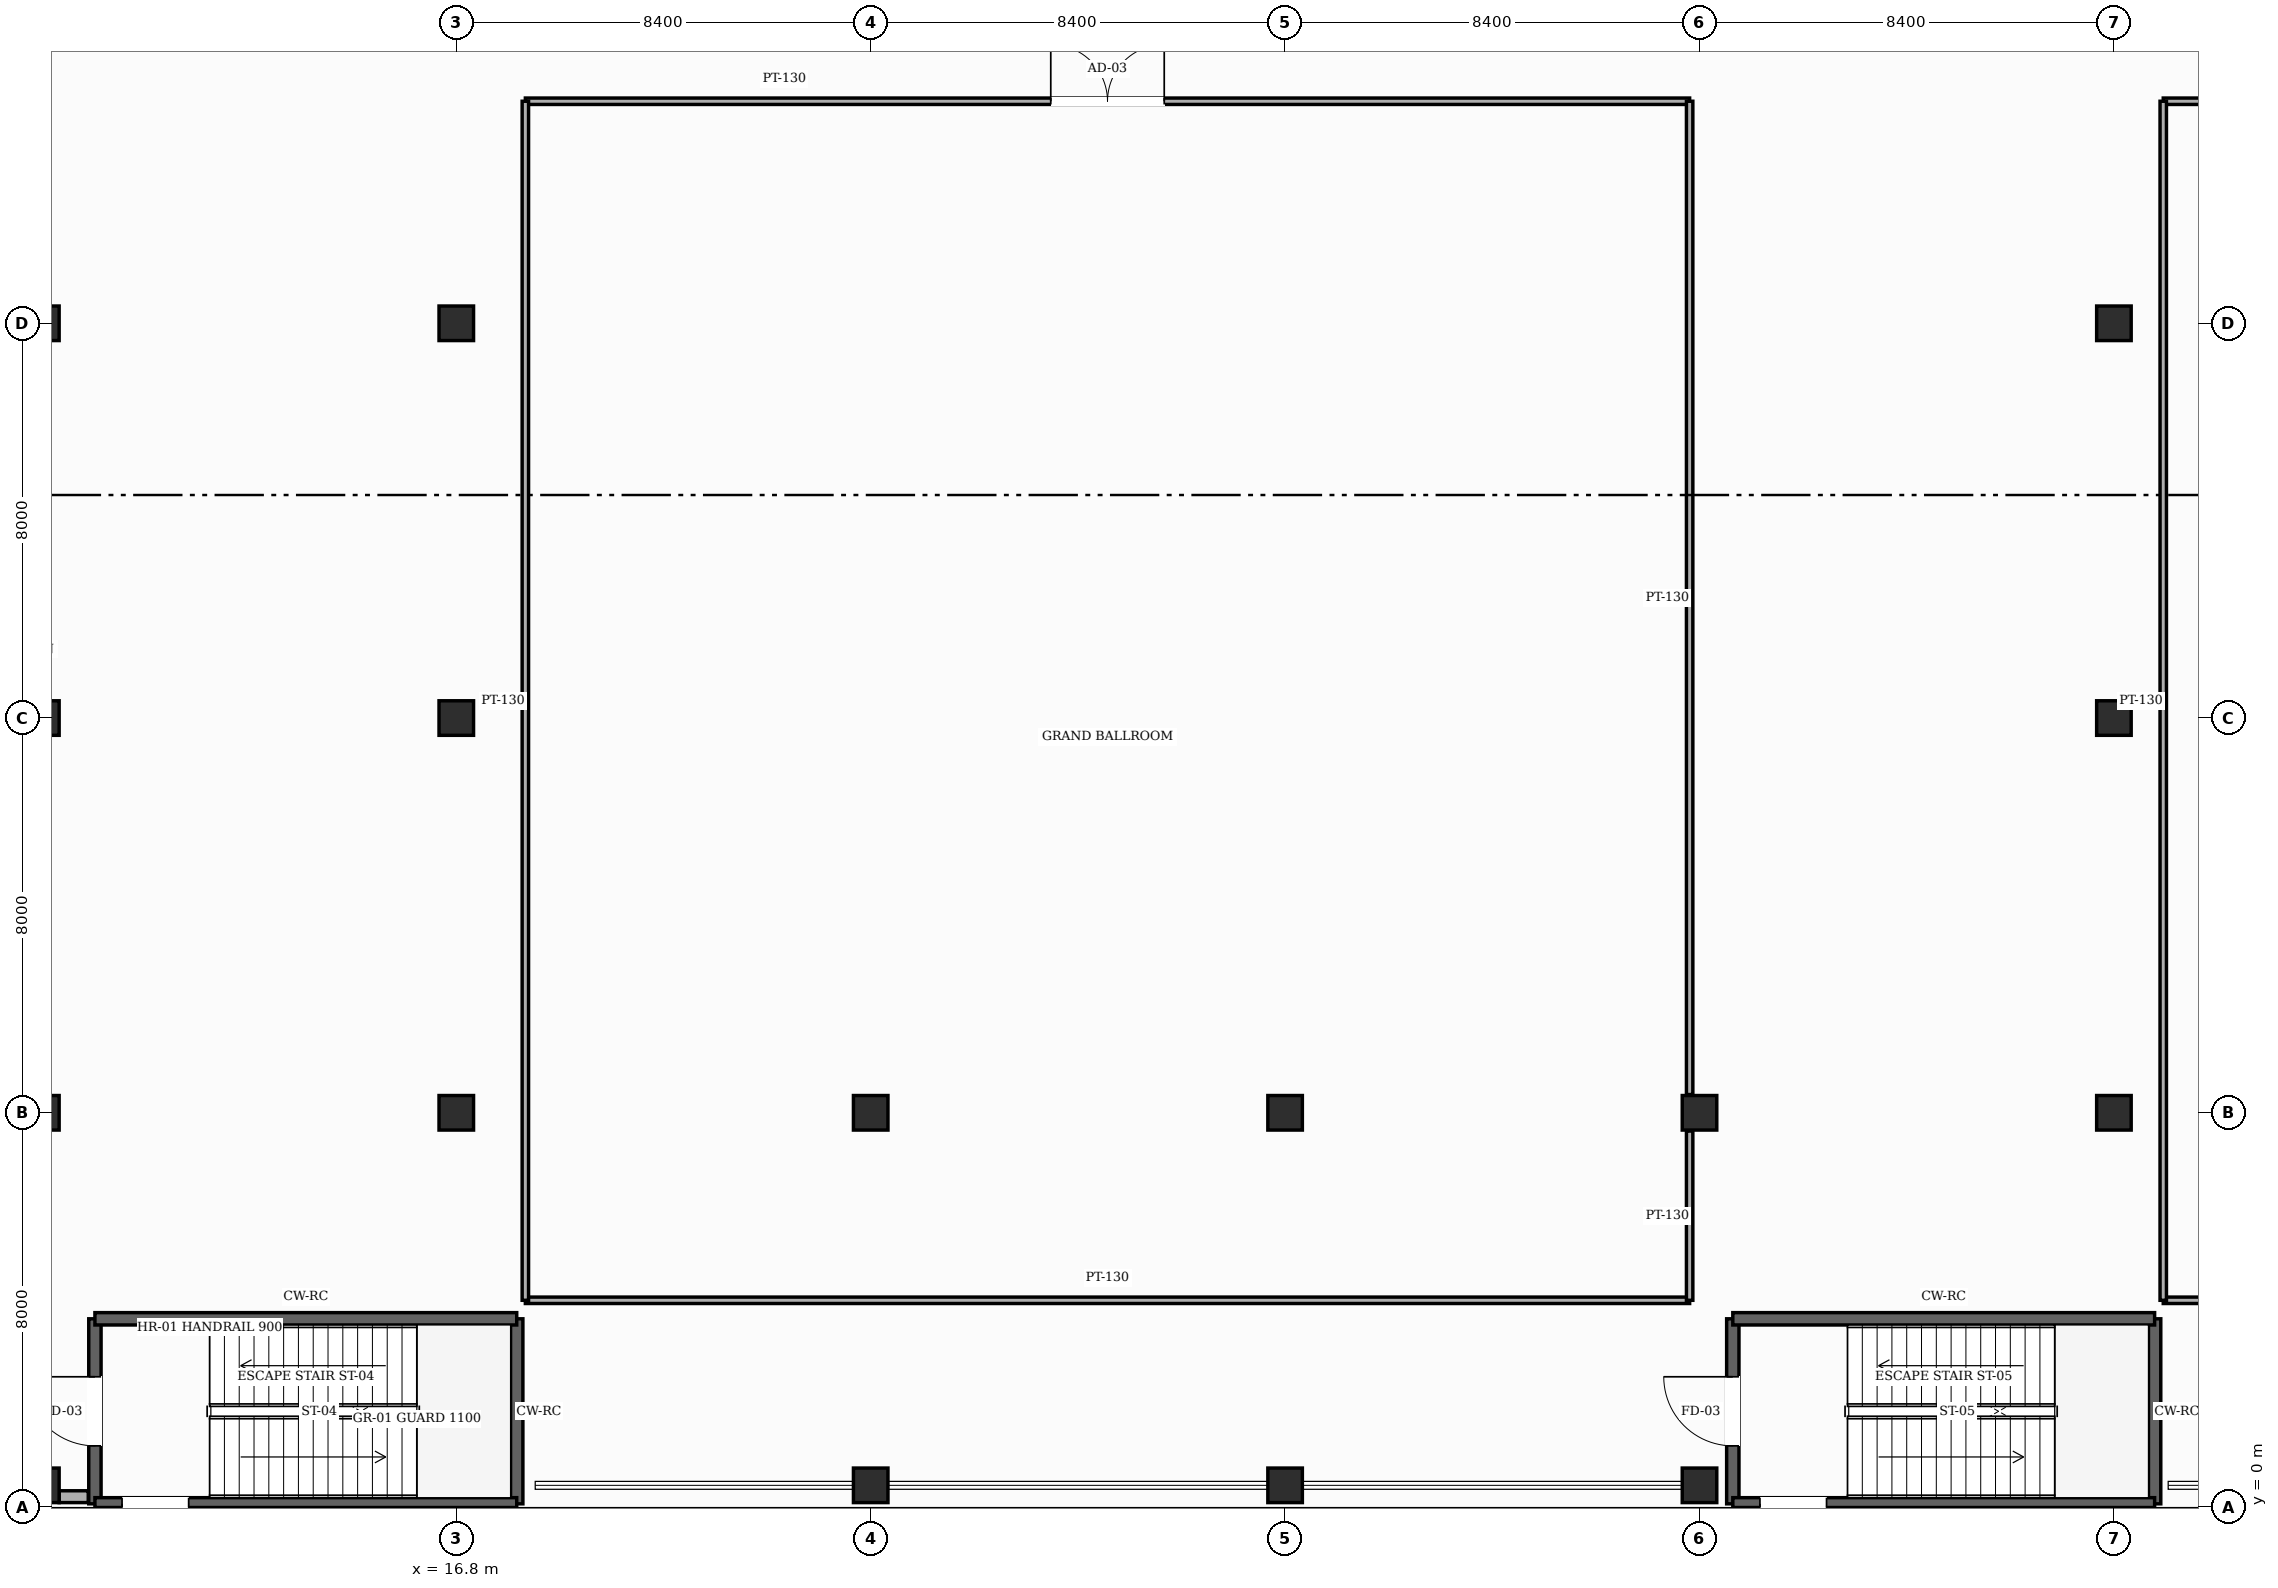
"""IFC4 building model, lengths in metres.
Left out: names, types, materials, properties, quantities, classifications, styles, units other than length and angle.
Written with IfcOpenShell. Run it as: python <this file> out.ifc"""

import sys

from ifc_helpers import new_model, si_unit, direction, frame, frame_2d, origin, origin_2d, place, context, subcontext, project, spatial, rectangle, hollow_rectangle, extrude, element, fill, save


model = new_model("IFC4")
c1 = context("Model", 3, precision=1e-05, world=origin(), true_north=direction((0.0, 1.0)))
c2 = subcontext(c1, "Body", "Model", "MODEL_VIEW")
j1 = project(units=[si_unit("LENGTHUNIT", "METRE"), si_unit("PLANEANGLEUNIT", "RADIAN")], contexts=[c1])
p1 = place(None, origin())
s1 = spatial("IfcSite", under=j1, at=p1, CompositionType="ELEMENT")
p2 = place(p1, origin())
s2 = spatial("IfcBuilding", under=s1, at=p2, CompositionType="ELEMENT")
p3 = place(p2, origin())
s3 = spatial("IfcBuildingStorey", under=s2, at=p3, CompositionType="ELEMENT", Elevation=0.0)
for number, where, z_axis, x_axis in (
    (1, (8.4, 0.45, 0.0), (0.0, 0.0, 1.0), (1.0, 0.0, 0.0)),
    (2, (8.4, 8.0, 0.0), (0.0, 0.0, 1.0), (1.0, 0.0, 0.0)),
    (3, (8.4, 16.0, 0.0), (0.0, 0.0, 1.0), (1.0, 0.0, 0.0)),
    (4, (8.4, 24.0, 0.0), (0.0, 0.0, 1.0), (1.0, 0.0, 0.0)),
    (5, (16.8, 8.0, 0.0), (0.0, 0.0, 1.0), (1.0, 0.0, 0.0)),
    (6, (16.8, 16.0, 0.0), (0.0, 0.0, 1.0), (1.0, 0.0, 0.0)),
    (7, (16.8, 24.0, 0.0), (0.0, 0.0, 1.0), (1.0, 0.0, 0.0)),
    (8, (25.2, 0.45, 0.0), (0.0, 0.0, 1.0), (1.0, 0.0, 0.0)),
    (9, (25.2, 8.0, 0.0), (0.0, 0.0, 1.0), (1.0, 0.0, 0.0)),
    (10, (33.6, 0.45, 0.0), (0.0, 0.0, 1.0), (1.0, 0.0, 0.0)),
    (11, (33.6, 8.0, 0.0), (0.0, 0.0, 1.0), (1.0, 0.0, 0.0)),
    (12, (42.0, 0.45, 0.0), (0.0, 0.0, 1.0), (1.0, 0.0, 0.0)),
    (13, (42.0, 8.0, 0.0), (0.0, 0.0, 1.0), (1.0, 0.0, 0.0)),
    (14, (50.4, 8.0, 0.0), (0.0, 0.0, 1.0), (1.0, 0.0, 0.0)),
    (15, (50.4, 16.0, 0.0), (0.0, 0.0, 1.0), (1.0, 0.0, 0.0)),
    (16, (50.4, 24.0, 0.0), (0.0, 0.0, 1.0), (1.0, 0.0, 0.0)),
):
    element("IfcColumn", number, at=place(p3, frame(where, z_axis=z_axis, x_axis=x_axis)), inside=s3, PredefinedType="COLUMN", context=c2, shape_type="SweptSolid", body=[
        extrude(hollow_rectangle(XDim=0.7, YDim=0.7, WallThickness=0.028, InnerFilletRadius=0.028, OuterFilletRadius=0.056, at=origin_2d()), origin(), (0.0, 0.0, 1.0), 5.4),
    ])
p4 = place(p3, frame((9.34, 0.22, 0.0), z_axis=(0.0, 0.0, 1.0), x_axis=(-1.0, 0.0, 0.0)))
e17 = element("IfcWall", 17, at=p4, inside=s3, PredefinedType="SOLIDWALL", context=c2, shape_type="SweptSolid", body=[
    extrude(rectangle(XDim=0.59, YDim=0.24, at=frame_2d((0.295, 0.0))), origin(), (0.0, 0.0, 1.0), 5.135),
])
p5 = place(p3, frame((9.475, 0.075, 0.0), z_axis=(0.0, 0.0, 1.0), x_axis=(0.0, 1.0, 0.0)))
e18 = element("IfcWall", 18, at=p5, inside=s3, PredefinedType="SHEAR", context=c2, shape_type="SweptSolid", body=[
    extrude(rectangle(XDim=3.75, YDim=0.25, at=frame_2d((1.875, 0.0))), origin(), (0.0, 0.0, 1.0), 5.15),
])
p6 = place(p5, frame((1.175, 0.0, 0.0)))
e19 = element("IfcOpeningElement", 19, at=p6, cuts=e18, PredefinedType="OPENING", context=c2, shape_type="SweptSolid", body=[
    extrude(rectangle(XDim=1.4, YDim=2.25, at=frame_2d((0.7, 1.125))), frame((0.0, 0.135, 0.0), z_axis=(0.0, -1.0, 0.0), x_axis=(1.0, 0.0, 0.0)), (0.0, 0.0, 1.0), 0.27),
])
p7 = place(p3, frame((18.025, 3.825, 0.0), z_axis=(0.0, 0.0, 1.0), x_axis=(0.0, -1.0, 0.0)))
e20 = element("IfcWall", 20, at=p7, inside=s3, PredefinedType="SHEAR", context=c2, shape_type="SweptSolid", body=[
    extrude(rectangle(XDim=3.75, YDim=0.25, at=frame_2d((1.875, 0.0))), origin(), (0.0, 0.0, 1.0), 5.15),
])
p8 = place(p3, frame((18.025, 0.075, 0.0), z_axis=(0.0, 0.0, 1.0), x_axis=(-1.0, 0.0, 0.0)))
e21 = element("IfcWall", 21, at=p8, inside=s3, PredefinedType="SHEAR", context=c2, shape_type="SweptSolid", body=[
    extrude(rectangle(XDim=8.55, YDim=0.25, at=frame_2d((4.275, 0.0))), origin(), (0.0, 0.0, 1.0), 5.15),
])
p9 = place(p8, frame((6.65, 0.0, 0.0)))
e22 = element("IfcOpeningElement", 22, at=p9, cuts=e21, PredefinedType="OPENING", context=c2, shape_type="SweptSolid", body=[
    extrude(rectangle(XDim=1.35, YDim=2.3, at=frame_2d((0.675, 1.15))), frame((0.0, 0.135, 0.0), z_axis=(0.0, -1.0, 0.0), x_axis=(1.0, 0.0, 0.0)), (0.0, 0.0, 1.0), 0.27),
])
p10 = place(p3, frame((9.475, 3.825, 0.0), z_axis=(0.0, 0.0, 1.0), x_axis=(1.0, 0.0, 0.0)))
e23 = element("IfcWall", 23, at=p10, inside=s3, PredefinedType="SHEAR", context=c2, shape_type="SweptSolid", body=[
    extrude(rectangle(XDim=8.55, YDim=0.25, at=frame_2d((4.275, 0.0))), origin(), (0.0, 0.0, 1.0), 5.15),
])
p11 = place(p3, frame((42.675, 0.075, 0.0), z_axis=(0.0, 0.0, 1.0), x_axis=(0.0, 1.0, 0.0)))
e24 = element("IfcWall", 24, at=p11, inside=s3, PredefinedType="SHEAR", context=c2, shape_type="SweptSolid", body=[
    extrude(rectangle(XDim=3.75, YDim=0.25, at=frame_2d((1.875, 0.0))), origin(), (0.0, 0.0, 1.0), 5.15),
])
p12 = place(p11, frame((1.175, 0.0, 0.0)))
e25 = element("IfcOpeningElement", 25, at=p12, cuts=e24, PredefinedType="OPENING", context=c2, shape_type="SweptSolid", body=[
    extrude(rectangle(XDim=1.4, YDim=2.25, at=frame_2d((0.7, 1.125))), frame((0.0, 0.135, 0.0), z_axis=(0.0, -1.0, 0.0), x_axis=(1.0, 0.0, 0.0)), (0.0, 0.0, 1.0), 0.27),
])
p13 = place(p3, frame((51.225, 3.825, 0.0), z_axis=(0.0, 0.0, 1.0), x_axis=(0.0, -1.0, 0.0)))
e26 = element("IfcWall", 26, at=p13, inside=s3, PredefinedType="SHEAR", context=c2, shape_type="SweptSolid", body=[
    extrude(rectangle(XDim=3.75, YDim=0.25, at=frame_2d((1.875, 0.0))), origin(), (0.0, 0.0, 1.0), 5.15),
])
p14 = place(p3, frame((51.225, 0.075, 0.0), z_axis=(0.0, 0.0, 1.0), x_axis=(-1.0, 0.0, 0.0)))
e27 = element("IfcWall", 27, at=p14, inside=s3, PredefinedType="SHEAR", context=c2, shape_type="SweptSolid", body=[
    extrude(rectangle(XDim=8.55, YDim=0.25, at=frame_2d((4.275, 0.0))), origin(), (0.0, 0.0, 1.0), 5.15),
])
p15 = place(p14, frame((6.65, 0.0, 0.0)))
e28 = element("IfcOpeningElement", 28, at=p15, cuts=e27, PredefinedType="OPENING", context=c2, shape_type="SweptSolid", body=[
    extrude(rectangle(XDim=1.35, YDim=2.3, at=frame_2d((0.675, 1.15))), frame((0.0, 0.135, 0.0), z_axis=(0.0, -1.0, 0.0), x_axis=(1.0, 0.0, 0.0)), (0.0, 0.0, 1.0), 0.27),
])
p16 = place(p3, frame((42.675, 3.825, 0.0), z_axis=(0.0, 0.0, 1.0), x_axis=(1.0, 0.0, 0.0)))
e29 = element("IfcWall", 29, at=p16, inside=s3, PredefinedType="SHEAR", context=c2, shape_type="SweptSolid", body=[
    extrude(rectangle(XDim=8.55, YDim=0.25, at=frame_2d((4.275, 0.0))), origin(), (0.0, 0.0, 1.0), 5.15),
])
p17 = place(p3, frame((18.2, 4.2, 0.0), z_axis=(0.0, 0.0, 1.0), x_axis=(1.0, 0.0, 0.0)))
e30 = element("IfcWall", 30, at=p17, inside=s3, PredefinedType="PARTITIONING", context=c2, shape_type="SweptSolid", body=[
    extrude(rectangle(XDim=23.6, YDim=0.13, at=frame_2d((11.8, 0.0))), origin(), (0.0, 0.0, 1.0), 4.725),
])
p18 = place(p3, frame((51.4, 4.2, 0.0), z_axis=(0.0, 0.0, 1.0), x_axis=(1.0, 0.0, 0.0)))
e31 = element("IfcWall", 31, at=p18, inside=s3, PredefinedType="PARTITIONING", context=c2, shape_type="SweptSolid", body=[
    extrude(rectangle(XDim=6.6, YDim=0.13, at=frame_2d((3.3, 0.0))), origin(), (0.0, 0.0, 1.0), 5.135),
])
p19 = place(p3, frame((18.2, 28.5, 0.0), z_axis=(0.0, 0.0, 1.0), x_axis=(1.0, 0.0, 0.0)))
e32 = element("IfcWall", 32, at=p19, inside=s3, PredefinedType="PARTITIONING", context=c2, shape_type="SweptSolid", body=[
    extrude(rectangle(XDim=23.6, YDim=0.13, at=frame_2d((11.8, 0.0))), origin(), (0.0, 0.0, 1.0), 5.135),
])
p20 = place(p19, frame((10.65, 0.0, 0.0)))
e33 = element("IfcOpeningElement", 33, at=p20, cuts=e32, PredefinedType="OPENING", context=c2, shape_type="SweptSolid", body=[
    extrude(rectangle(XDim=2.3, YDim=2.55, at=frame_2d((1.15, 1.275))), frame((0.0, 0.075, 0.0), z_axis=(0.0, -1.0, 0.0), x_axis=(1.0, 0.0, 0.0)), (0.0, 0.0, 1.0), 0.15),
])
p21 = place(p3, frame((51.4, 28.5, 0.0), z_axis=(0.0, 0.0, 1.0), x_axis=(1.0, 0.0, 0.0)))
e34 = element("IfcWall", 34, at=p21, inside=s3, PredefinedType="PARTITIONING", context=c2, shape_type="SweptSolid", body=[
    extrude(rectangle(XDim=6.6, YDim=0.13, at=frame_2d((3.3, 0.0))), origin(), (0.0, 0.0, 1.0), 5.135),
])
p22 = place(p21, frame((2.275, 0.0, 0.0)))
e35 = element("IfcOpeningElement", 35, at=p22, cuts=e34, PredefinedType="OPENING", context=c2, shape_type="SweptSolid", body=[
    extrude(rectangle(XDim=2.05, YDim=2.45, at=frame_2d((1.025, 1.225))), frame((0.0, 0.075, 0.0), z_axis=(0.0, -1.0, 0.0), x_axis=(1.0, 0.0, 0.0)), (0.0, 0.0, 1.0), 0.15),
])
p23 = place(p3, frame((18.2, 4.2, 0.0), z_axis=(0.0, 0.0, 1.0), x_axis=(0.0, 1.0, 0.0)))
e36 = element("IfcWall", 36, at=p23, inside=s3, PredefinedType="PARTITIONING", context=c2, shape_type="SweptSolid", body=[
    extrude(rectangle(XDim=24.3, YDim=0.13, at=frame_2d((12.15, 0.0))), origin(), (0.0, 0.0, 1.0), 5.135),
])
p24 = place(p3, frame((41.8, 4.2, 0.0), z_axis=(0.0, 0.0, 1.0), x_axis=(0.0, 1.0, 0.0)))
e37 = element("IfcWall", 37, at=p24, inside=s3, PredefinedType="PARTITIONING", context=c2, shape_type="SweptSolid", body=[
    extrude(rectangle(XDim=3.43, YDim=0.13, at=frame_2d((1.715, 0.0))), origin(), (0.0, 0.0, 1.0), 4.475),
])
p25 = place(p3, frame((41.8, 8.37, 0.0), z_axis=(0.0, 0.0, 1.0), x_axis=(0.0, 1.0, 0.0)))
e38 = element("IfcWall", 38, at=p25, inside=s3, PredefinedType="PARTITIONING", context=c2, shape_type="SweptSolid", body=[
    extrude(rectangle(XDim=20.13, YDim=0.13, at=frame_2d((10.065, 0.0))), origin(), (0.0, 0.0, 1.0), 3.925),
])
p26 = place(p3, frame((51.4, 4.2, 0.0), z_axis=(0.0, 0.0, 1.0), x_axis=(0.0, 1.0, 0.0)))
e39 = element("IfcWall", 39, at=p26, inside=s3, PredefinedType="PARTITIONING", context=c2, shape_type="SweptSolid", body=[
    extrude(rectangle(XDim=24.3, YDim=0.13, at=frame_2d((12.15, 0.0))), origin(), (0.0, 0.0, 1.0), 5.135),
])
p27 = place(p6, origin())
e40 = element("IfcDoor", 40, at=p27, inside=s3, OperationType="SINGLE_SWING_RIGHT", PredefinedType="DOOR", context=c2, shape_type="SweptSolid", body=[
    extrude(rectangle(XDim=1.4, YDim=2.25, at=frame_2d((0.7, 1.125))), frame((0.0, 0.025, 0.0), z_axis=(0.0, -1.0, 0.0), x_axis=(1.0, 0.0, 0.0)), (0.0, 0.0, 1.0), 0.05),
])
fill(e19, e40)
p28 = place(p9, origin())
e41 = element("IfcDoor", 41, at=p28, inside=s3, OperationType="SINGLE_SWING_RIGHT", PredefinedType="DOOR", context=c2, shape_type="SweptSolid", body=[
    extrude(rectangle(XDim=1.35, YDim=2.3, at=frame_2d((0.675, 1.15))), frame((0.0, 0.025, 0.0), z_axis=(0.0, -1.0, 0.0), x_axis=(1.0, 0.0, 0.0)), (0.0, 0.0, 1.0), 0.05),
])
fill(e22, e41)
p29 = place(p12, origin())
e42 = element("IfcDoor", 42, at=p29, inside=s3, OperationType="SINGLE_SWING_RIGHT", PredefinedType="DOOR", context=c2, shape_type="SweptSolid", body=[
    extrude(rectangle(XDim=1.4, YDim=2.25, at=frame_2d((0.7, 1.125))), frame((0.0, 0.025, 0.0), z_axis=(0.0, -1.0, 0.0), x_axis=(1.0, 0.0, 0.0)), (0.0, 0.0, 1.0), 0.05),
])
fill(e25, e42)
p30 = place(p15, origin())
e43 = element("IfcDoor", 43, at=p30, inside=s3, OperationType="SINGLE_SWING_RIGHT", PredefinedType="DOOR", context=c2, shape_type="SweptSolid", body=[
    extrude(rectangle(XDim=1.35, YDim=2.3, at=frame_2d((0.675, 1.15))), frame((0.0, 0.025, 0.0), z_axis=(0.0, -1.0, 0.0), x_axis=(1.0, 0.0, 0.0)), (0.0, 0.0, 1.0), 0.05),
])
fill(e28, e43)
p31 = place(p20, origin())
e44 = element("IfcDoor", 44, at=p31, inside=s3, OperationType="DOUBLE_DOOR_SINGLE_SWING", PredefinedType="DOOR", context=c2, shape_type="SweptSolid", body=[
    extrude(rectangle(XDim=2.3, YDim=2.55, at=frame_2d((1.15, 1.275))), frame((0.0, 0.025, 0.0), z_axis=(0.0, -1.0, 0.0), x_axis=(1.0, 0.0, 0.0)), (0.0, 0.0, 1.0), 0.05),
])
fill(e33, e44)
save(model, sys.argv[1])
